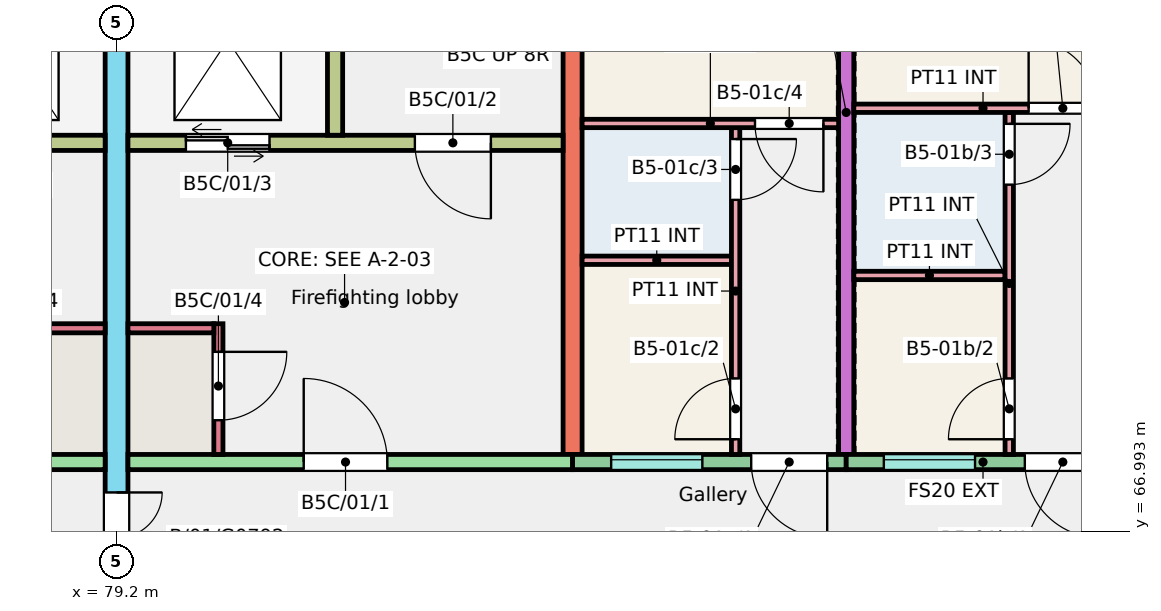
"""IFC4 building model, lengths in metres.
Left out: names, types, materials, properties, quantities, classifications, styles, units other than length and angle.
Written with IfcOpenShell. Run it as: python <this file> out.ifc"""

import sys

from ifc_helpers import new_model, si_unit, direction, frame, frame_2d, origin, place, context, subcontext, project, spatial, rectangle, extrude, element, fill, save


model = new_model("IFC4")
c1 = context("Model", 3, precision=1e-05, world=origin(), true_north=direction((0.0, 1.0)))
c2 = subcontext(c1, "Body", "Model", "MODEL_VIEW")
j1 = project(units=[si_unit("LENGTHUNIT", "METRE"), si_unit("PLANEANGLEUNIT", "RADIAN")], contexts=[c1])
p1 = place(None, origin())
s1 = spatial("IfcSite", under=j1, at=p1, CompositionType="ELEMENT")
p2 = place(p1, origin())
s2 = spatial("IfcBuilding", under=s1, at=p2, CompositionType="ELEMENT")
p3 = place(p2, frame((0.0, 0.0, 3.0)))
s3 = spatial("IfcBuildingStorey", under=s2, at=p3, CompositionType="ELEMENT", Elevation=3.0)
p4 = place(p3, frame((79.2, 66.0, 0.0), z_axis=(0.0, 0.0, 1.0), x_axis=(0.0, 1.0, 0.0)))
e1 = element("IfcWall", 1, at=p4, inside=s3, PredefinedType="SHEAR", context=c2, shape_type="SweptSolid", body=[
    extrude(rectangle(XDim=11.0, YDim=0.3, at=frame_2d((5.5, 0.0))), origin(), (0.0, 0.0, 1.0), 3.0),
])
p5 = place(p4, frame((0.3, 0.0, 0.0)))
e2 = element("IfcOpeningElement", 2, at=p5, cuts=e1, PredefinedType="OPENING", context=c2, shape_type="SweptSolid", body=[
    extrude(rectangle(XDim=1.2, YDim=2.1, at=frame_2d((0.6, 1.05))), frame((0.0, 0.16, 0.0), z_axis=(0.0, -1.0, 0.0), x_axis=(1.0, 0.0, 0.0)), (0.0, 0.0, 1.0), 0.32),
])
p6 = place(p3, frame((85.2, 68.0, 0.0), z_axis=(0.0, 0.0, 1.0), x_axis=(0.0, 1.0, 0.0)))
e3 = element("IfcWall", 3, at=p6, inside=s3, PredefinedType="SHEAR", context=c2, shape_type="SweptSolid", body=[
    extrude(rectangle(XDim=9.0, YDim=0.25, at=frame_2d((4.5, 0.0))), origin(), (0.0, 0.0, 1.0), 3.0),
])
p7 = place(p3, frame((88.8, 68.0, 0.0), z_axis=(0.0, 0.0, 1.0), x_axis=(0.0, 1.0, 0.0)))
e4 = element("IfcWall", 4, at=p7, inside=s3, PredefinedType="SHEAR", context=c2, shape_type="SweptSolid", body=[
    extrude(rectangle(XDim=9.0, YDim=0.2, at=frame_2d((4.5, 0.0))), origin(), (0.0, 0.0, 1.0), 3.0),
])
p8 = place(p3, frame((73.2, 67.9, 0.0), z_axis=(0.0, 0.0, 1.0), x_axis=(1.0, 0.0, 0.0)))
e5 = element("IfcWall", 5, at=p8, inside=s3, PredefinedType="SHEAR", context=c2, shape_type="SweptSolid", body=[
    extrude(rectangle(XDim=5.85, YDim=0.2, at=frame_2d((2.925, 0.0))), origin(), (0.0, 0.0, 1.0), 3.0),
])
p9 = place(p8, frame((2.438, 0.0, 0.0)))
e6 = element("IfcOpeningElement", 6, at=p9, cuts=e5, PredefinedType="OPENING", context=c2, shape_type="SweptSolid", body=[
    extrude(rectangle(XDim=1.1, YDim=2.1, at=frame_2d((0.55, 1.05))), frame((0.0, 0.11, 0.0), z_axis=(0.0, -1.0, 0.0), x_axis=(1.0, 0.0, 0.0)), (0.0, 0.0, 1.0), 0.22),
])
p10 = place(p3, frame((73.325, 72.1, 0.0), z_axis=(0.0, 0.0, 1.0), x_axis=(1.0, 0.0, 0.0)))
e7 = element("IfcWall", 7, at=p10, inside=s3, PredefinedType="SHEAR", context=c2, shape_type="SweptSolid", body=[
    extrude(rectangle(XDim=5.725, YDim=0.2, at=frame_2d((2.863, 0.0))), origin(), (0.0, 0.0, 1.0), 3.0),
])
p11 = place(p10, frame((0.95, 0.0, 0.0)))
e8 = element("IfcOpeningElement", 8, at=p11, cuts=e7, PredefinedType="OPENING", context=c2, shape_type="SweptSolid", body=[
    extrude(rectangle(XDim=1.0, YDim=2.1, at=frame_2d((0.5, 1.05))), frame((0.0, 0.11, 0.0), z_axis=(0.0, -1.0, 0.0), x_axis=(1.0, 0.0, 0.0)), (0.0, 0.0, 1.0), 0.22),
])
p12 = place(p10, frame((3.863, 0.0, 0.0)))
e9 = element("IfcOpeningElement", 9, at=p12, cuts=e7, PredefinedType="OPENING", context=c2, shape_type="SweptSolid", body=[
    extrude(rectangle(XDim=1.1, YDim=2.1, at=frame_2d((0.55, 1.05))), frame((0.0, 0.11, 0.0), z_axis=(0.0, -1.0, 0.0), x_axis=(1.0, 0.0, 0.0)), (0.0, 0.0, 1.0), 0.22),
])
p13 = place(p3, frame((77.92, 69.66, 0.0), z_axis=(0.0, 0.0, 1.0), x_axis=(1.0, 0.0, 0.0)))
e10 = element("IfcWall", 10, at=p13, inside=s3, PredefinedType="SHEAR", context=c2, shape_type="SweptSolid", body=[
    extrude(rectangle(XDim=1.13, YDim=0.12, at=frame_2d((0.565, 0.0))), origin(), (0.0, 0.0, 1.0), 3.0),
])
p14 = place(p3, frame((79.35, 67.9, 0.0), z_axis=(0.0, 0.0, 1.0), x_axis=(1.0, 0.0, 0.0)))
e11 = element("IfcWall", 11, at=p14, inside=s3, PredefinedType="SHEAR", context=c2, shape_type="SweptSolid", body=[
    extrude(rectangle(XDim=5.85, YDim=0.2, at=frame_2d((2.925, 0.0))), origin(), (0.0, 0.0, 1.0), 3.0),
])
p15 = place(p14, frame((2.312, 0.0, 0.0)))
e12 = element("IfcOpeningElement", 12, at=p15, cuts=e11, PredefinedType="OPENING", context=c2, shape_type="SweptSolid", body=[
    extrude(rectangle(XDim=1.1, YDim=2.1, at=frame_2d((0.55, 1.05))), frame((0.0, 0.11, 0.0), z_axis=(0.0, -1.0, 0.0), x_axis=(1.0, 0.0, 0.0)), (0.0, 0.0, 1.0), 0.22),
])
p16 = place(p3, frame((79.35, 72.1, 0.0), z_axis=(0.0, 0.0, 1.0), x_axis=(1.0, 0.0, 0.0)))
e13 = element("IfcWall", 13, at=p16, inside=s3, PredefinedType="SHEAR", context=c2, shape_type="SweptSolid", body=[
    extrude(rectangle(XDim=5.725, YDim=0.2, at=frame_2d((2.862, 0.0))), origin(), (0.0, 0.0, 1.0), 3.0),
])
p17 = place(p16, frame((3.775, 0.0, 0.0)))
e14 = element("IfcOpeningElement", 14, at=p17, cuts=e13, PredefinedType="OPENING", context=c2, shape_type="SweptSolid", body=[
    extrude(rectangle(XDim=1.0, YDim=2.1, at=frame_2d((0.5, 1.05))), frame((0.0, 0.11, 0.0), z_axis=(0.0, -1.0, 0.0), x_axis=(1.0, 0.0, 0.0)), (0.0, 0.0, 1.0), 0.22),
])
p18 = place(p16, frame((0.762, 0.0, 0.0)))
e15 = element("IfcOpeningElement", 15, at=p18, cuts=e13, PredefinedType="OPENING", context=c2, shape_type="SweptSolid", body=[
    extrude(rectangle(XDim=1.1, YDim=2.1, at=frame_2d((0.55, 1.05))), frame((0.0, 0.11, 0.0), z_axis=(0.0, -1.0, 0.0), x_axis=(1.0, 0.0, 0.0)), (0.0, 0.0, 1.0), 0.22),
])
p19 = place(p3, frame((82.075, 72.2, 0.0), z_axis=(0.0, 0.0, 1.0), x_axis=(0.0, 1.0, 0.0)))
e16 = element("IfcWall", 16, at=p19, inside=s3, PredefinedType="SHEAR", context=c2, shape_type="SweptSolid", body=[
    extrude(rectangle(XDim=4.8, YDim=0.2, at=frame_2d((2.4, 0.0))), origin(), (0.0, 0.0, 1.0), 3.0),
])
p20 = place(p3, frame((80.54, 68.0, 0.0), z_axis=(0.0, 0.0, 1.0), x_axis=(0.0, 1.0, 0.0)))
e17 = element("IfcWall", 17, at=p20, inside=s3, PredefinedType="SHEAR", context=c2, shape_type="SweptSolid", body=[
    extrude(rectangle(XDim=1.72, YDim=0.12, at=frame_2d((0.86, 0.0))), origin(), (0.0, 0.0, 1.0), 3.0),
])
p21 = place(p20, frame((0.45, 0.0, 0.0)))
e18 = element("IfcOpeningElement", 18, at=p21, cuts=e17, PredefinedType="OPENING", context=c2, shape_type="SweptSolid", body=[
    extrude(rectangle(XDim=0.9, YDim=2.1, at=frame_2d((0.45, 1.05))), frame((0.0, 0.07, 0.0), z_axis=(0.0, -1.0, 0.0), x_axis=(1.0, 0.0, 0.0)), (0.0, 0.0, 1.0), 0.14),
])
p22 = place(p3, frame((79.35, 69.66, 0.0), z_axis=(0.0, 0.0, 1.0), x_axis=(1.0, 0.0, 0.0)))
e19 = element("IfcWall", 19, at=p22, inside=s3, PredefinedType="SHEAR", context=c2, shape_type="SweptSolid", body=[
    extrude(rectangle(XDim=1.13, YDim=0.12, at=frame_2d((0.565, 0.0))), origin(), (0.0, 0.0, 1.0), 3.0),
])
p23 = place(p3, frame((85.2, 67.9, 0.0), z_axis=(0.0, 0.0, 1.0), x_axis=(1.0, 0.0, 0.0)))
e20 = element("IfcWall", 20, at=p23, inside=s3, PredefinedType="SOLIDWALL", context=c2, shape_type="SweptSolid", body=[
    extrude(rectangle(XDim=3.6, YDim=0.2, at=frame_2d((1.8, 0.0))), origin(), (0.0, 0.0, 1.0), 3.0),
])
p24 = place(p23, frame((0.508, 0.0, 1.1)))
e21 = element("IfcOpeningElement", 21, at=p24, cuts=e20, PredefinedType="OPENING", context=c2, shape_type="SweptSolid", body=[
    extrude(rectangle(XDim=1.2, YDim=1.3, at=frame_2d((0.6, 0.65))), frame((0.0, 0.11, 0.0), z_axis=(0.0, -1.0, 0.0), x_axis=(1.0, 0.0, 0.0)), (0.0, 0.0, 1.0), 0.22),
])
p25 = place(p23, frame((2.35, 0.0, 0.0)))
e22 = element("IfcOpeningElement", 22, at=p25, cuts=e20, PredefinedType="OPENING", context=c2, shape_type="SweptSolid", body=[
    extrude(rectangle(XDim=1.0, YDim=2.1, at=frame_2d((0.5, 1.05))), frame((0.0, 0.11, 0.0), z_axis=(0.0, -1.0, 0.0), x_axis=(1.0, 0.0, 0.0)), (0.0, 0.0, 1.0), 0.22),
])
p26 = place(p3, frame((88.8, 67.9, 0.0), z_axis=(0.0, 0.0, 1.0), x_axis=(1.0, 0.0, 0.0)))
e23 = element("IfcWall", 23, at=p26, inside=s3, PredefinedType="SOLIDWALL", context=c2, shape_type="SweptSolid", body=[
    extrude(rectangle(XDim=3.6, YDim=0.2, at=frame_2d((1.8, 0.0))), origin(), (0.0, 0.0, 1.0), 3.0),
])
p27 = place(p26, frame((0.495, 0.0, 1.1)))
e24 = element("IfcOpeningElement", 24, at=p27, cuts=e23, PredefinedType="OPENING", context=c2, shape_type="SweptSolid", body=[
    extrude(rectangle(XDim=1.2, YDim=1.3, at=frame_2d((0.6, 0.65))), frame((0.0, 0.11, 0.0), z_axis=(0.0, -1.0, 0.0), x_axis=(1.0, 0.0, 0.0)), (0.0, 0.0, 1.0), 0.22),
])
p28 = place(p26, frame((2.35, 0.0, 0.0)))
e25 = element("IfcOpeningElement", 25, at=p28, cuts=e23, PredefinedType="OPENING", context=c2, shape_type="SweptSolid", body=[
    extrude(rectangle(XDim=1.0, YDim=2.1, at=frame_2d((0.5, 1.05))), frame((0.0, 0.11, 0.0), z_axis=(0.0, -1.0, 0.0), x_axis=(1.0, 0.0, 0.0)), (0.0, 0.0, 1.0), 0.22),
])
p29 = place(p3, frame((88.9, 70.355, 0.0), z_axis=(0.0, 0.0, 1.0), x_axis=(1.0, 0.0, 0.0)))
e26 = element("IfcWall", 26, at=p29, inside=s3, PredefinedType="PARTITIONING", context=c2, shape_type="SweptSolid", body=[
    extrude(rectangle(XDim=1.99, YDim=0.11, at=frame_2d((0.995, 0.0))), origin(), (0.0, 0.0, 1.0), 2.8),
])
p30 = place(p3, frame((90.945, 68.0, 0.0), z_axis=(0.0, 0.0, 1.0), x_axis=(0.0, 1.0, 0.0)))
e27 = element("IfcWall", 27, at=p30, inside=s3, PredefinedType="PARTITIONING", context=c2, shape_type="SweptSolid", body=[
    extrude(rectangle(XDim=4.5, YDim=0.11, at=frame_2d((2.25, 0.0))), origin(), (0.0, 0.0, 1.0), 2.8),
])
p31 = place(p30, frame((0.2, 0.0, 0.0)))
e28 = element("IfcOpeningElement", 28, at=p31, cuts=e27, PredefinedType="OPENING", context=c2, shape_type="SweptSolid", body=[
    extrude(rectangle(XDim=0.8, YDim=2.1, at=frame_2d((0.4, 1.05))), frame((0.0, 0.065, 0.0), z_axis=(0.0, -1.0, 0.0), x_axis=(1.0, 0.0, 0.0)), (0.0, 0.0, 1.0), 0.13),
])
p32 = place(p30, frame((3.55, 0.0, 0.0)))
e29 = element("IfcOpeningElement", 29, at=p32, cuts=e27, PredefinedType="OPENING", context=c2, shape_type="SweptSolid", body=[
    extrude(rectangle(XDim=0.8, YDim=2.1, at=frame_2d((0.4, 1.05))), frame((0.0, 0.065, 0.0), z_axis=(0.0, -1.0, 0.0), x_axis=(1.0, 0.0, 0.0)), (0.0, 0.0, 1.0), 0.13),
])
p33 = place(p3, frame((88.9, 72.555, 0.0), z_axis=(0.0, 0.0, 1.0), x_axis=(1.0, 0.0, 0.0)))
e30 = element("IfcWall", 30, at=p33, inside=s3, PredefinedType="PARTITIONING", context=c2, shape_type="SweptSolid", body=[
    extrude(rectangle(XDim=3.4, YDim=0.11, at=frame_2d((1.7, 0.0))), origin(), (0.0, 0.0, 1.0), 2.8),
])
p34 = place(p33, frame((2.3, 0.0, 0.0)))
e31 = element("IfcOpeningElement", 31, at=p34, cuts=e30, PredefinedType="OPENING", context=c2, shape_type="SweptSolid", body=[
    extrude(rectangle(XDim=0.9, YDim=2.1, at=frame_2d((0.45, 1.05))), frame((0.0, 0.065, 0.0), z_axis=(0.0, -1.0, 0.0), x_axis=(1.0, 0.0, 0.0)), (0.0, 0.0, 1.0), 0.13),
])
p35 = place(p3, frame((85.325, 70.555, 0.0), z_axis=(0.0, 0.0, 1.0), x_axis=(1.0, 0.0, 0.0)))
e32 = element("IfcWall", 32, at=p35, inside=s3, PredefinedType="PARTITIONING", context=c2, shape_type="SweptSolid", body=[
    extrude(rectangle(XDim=1.965, YDim=0.11, at=frame_2d((0.982, 0.0))), origin(), (0.0, 0.0, 1.0), 2.8),
])
p36 = place(p3, frame((87.345, 68.0, 0.0), z_axis=(0.0, 0.0, 1.0), x_axis=(0.0, 1.0, 0.0)))
e33 = element("IfcWall", 33, at=p36, inside=s3, PredefinedType="PARTITIONING", context=c2, shape_type="SweptSolid", body=[
    extrude(rectangle(XDim=4.3, YDim=0.11, at=frame_2d((2.15, 0.0))), origin(), (0.0, 0.0, 1.0), 2.8),
])
p37 = place(p36, frame((0.2, 0.0, 0.0)))
e34 = element("IfcOpeningElement", 34, at=p37, cuts=e33, PredefinedType="OPENING", context=c2, shape_type="SweptSolid", body=[
    extrude(rectangle(XDim=0.8, YDim=2.1, at=frame_2d((0.4, 1.05))), frame((0.0, 0.065, 0.0), z_axis=(0.0, -1.0, 0.0), x_axis=(1.0, 0.0, 0.0)), (0.0, 0.0, 1.0), 0.13),
])
p38 = place(p36, frame((3.35, 0.0, 0.0)))
e35 = element("IfcOpeningElement", 35, at=p38, cuts=e33, PredefinedType="OPENING", context=c2, shape_type="SweptSolid", body=[
    extrude(rectangle(XDim=0.8, YDim=2.1, at=frame_2d((0.4, 1.05))), frame((0.0, 0.065, 0.0), z_axis=(0.0, -1.0, 0.0), x_axis=(1.0, 0.0, 0.0)), (0.0, 0.0, 1.0), 0.13),
])
p39 = place(p3, frame((85.325, 72.355, 0.0), z_axis=(0.0, 0.0, 1.0), x_axis=(1.0, 0.0, 0.0)))
e36 = element("IfcWall", 36, at=p39, inside=s3, PredefinedType="PARTITIONING", context=c2, shape_type="SweptSolid", body=[
    extrude(rectangle(XDim=3.375, YDim=0.11, at=frame_2d((1.688, 0.0))), origin(), (0.0, 0.0, 1.0), 2.8),
])
p40 = place(p39, frame((2.275, 0.0, 0.0)))
e37 = element("IfcOpeningElement", 37, at=p40, cuts=e36, PredefinedType="OPENING", context=c2, shape_type="SweptSolid", body=[
    extrude(rectangle(XDim=0.9, YDim=2.1, at=frame_2d((0.45, 1.05))), frame((0.0, 0.065, 0.0), z_axis=(0.0, -1.0, 0.0), x_axis=(1.0, 0.0, 0.0)), (0.0, 0.0, 1.0), 0.13),
])
p41 = place(p27, origin())
e38 = element("IfcWindow", 38, at=p41, inside=s3, PartitioningType="SINGLE_PANEL", PredefinedType="WINDOW", context=c2, shape_type="SweptSolid", body=[
    extrude(rectangle(XDim=1.2, YDim=1.3, at=frame_2d((0.6, 0.65))), frame((0.0, 0.06, 0.0), z_axis=(0.0, -1.0, 0.0), x_axis=(1.0, 0.0, 0.0)), (0.0, 0.0, 1.0), 0.06),
])
fill(e24, e38)
p42 = place(p24, origin())
e39 = element("IfcWindow", 39, at=p42, inside=s3, PartitioningType="SINGLE_PANEL", PredefinedType="WINDOW", context=c2, shape_type="SweptSolid", body=[
    extrude(rectangle(XDim=1.2, YDim=1.3, at=frame_2d((0.6, 0.65))), frame((0.0, 0.06, 0.0), z_axis=(0.0, -1.0, 0.0), x_axis=(1.0, 0.0, 0.0)), (0.0, 0.0, 1.0), 0.06),
])
fill(e21, e39)
p43 = place(p28, origin())
e40 = element("IfcDoor", 40, at=p43, inside=s3, OperationType="SINGLE_SWING_RIGHT", PredefinedType="DOOR", context=c2, shape_type="SweptSolid", body=[
    extrude(rectangle(XDim=1.0, YDim=2.1, at=frame_2d((0.5, 1.05))), frame((0.0, 0.025, 0.0), z_axis=(0.0, -1.0, 0.0), x_axis=(1.0, 0.0, 0.0)), (0.0, 0.0, 1.0), 0.05),
])
fill(e25, e40)
p44 = place(p31, origin())
e41 = element("IfcDoor", 41, at=p44, inside=s3, OperationType="SINGLE_SWING_LEFT", PredefinedType="DOOR", context=c2, shape_type="SweptSolid", body=[
    extrude(rectangle(XDim=0.8, YDim=2.1, at=frame_2d((0.4, 1.05))), frame((0.0, 0.025, 0.0), z_axis=(0.0, -1.0, 0.0), x_axis=(1.0, 0.0, 0.0)), (0.0, 0.0, 1.0), 0.05),
])
fill(e28, e41)
p45 = place(p32, origin())
e42 = element("IfcDoor", 42, at=p45, inside=s3, OperationType="SINGLE_SWING_RIGHT", PredefinedType="DOOR", context=c2, shape_type="SweptSolid", body=[
    extrude(rectangle(XDim=0.8, YDim=2.1, at=frame_2d((0.4, 1.05))), frame((0.0, 0.025, 0.0), z_axis=(0.0, -1.0, 0.0), x_axis=(1.0, 0.0, 0.0)), (0.0, 0.0, 1.0), 0.05),
])
fill(e29, e42)
p46 = place(p34, origin())
e43 = element("IfcDoor", 43, at=p46, inside=s3, OperationType="SINGLE_SWING_LEFT", PredefinedType="DOOR", context=c2, shape_type="SweptSolid", body=[
    extrude(rectangle(XDim=0.9, YDim=2.1, at=frame_2d((0.45, 1.05))), frame((0.0, 0.025, 0.0), z_axis=(0.0, -1.0, 0.0), x_axis=(1.0, 0.0, 0.0)), (0.0, 0.0, 1.0), 0.05),
])
fill(e31, e43)
p47 = place(p25, origin())
e44 = element("IfcDoor", 44, at=p47, inside=s3, OperationType="SINGLE_SWING_RIGHT", PredefinedType="DOOR", context=c2, shape_type="SweptSolid", body=[
    extrude(rectangle(XDim=1.0, YDim=2.1, at=frame_2d((0.5, 1.05))), frame((0.0, 0.025, 0.0), z_axis=(0.0, -1.0, 0.0), x_axis=(1.0, 0.0, 0.0)), (0.0, 0.0, 1.0), 0.05),
])
fill(e22, e44)
p48 = place(p37, origin())
e45 = element("IfcDoor", 45, at=p48, inside=s3, OperationType="SINGLE_SWING_LEFT", PredefinedType="DOOR", context=c2, shape_type="SweptSolid", body=[
    extrude(rectangle(XDim=0.8, YDim=2.1, at=frame_2d((0.4, 1.05))), frame((0.0, 0.025, 0.0), z_axis=(0.0, -1.0, 0.0), x_axis=(1.0, 0.0, 0.0)), (0.0, 0.0, 1.0), 0.05),
])
fill(e34, e45)
p49 = place(p38, origin())
e46 = element("IfcDoor", 46, at=p49, inside=s3, OperationType="SINGLE_SWING_RIGHT", PredefinedType="DOOR", context=c2, shape_type="SweptSolid", body=[
    extrude(rectangle(XDim=0.8, YDim=2.1, at=frame_2d((0.4, 1.05))), frame((0.0, 0.025, 0.0), z_axis=(0.0, -1.0, 0.0), x_axis=(1.0, 0.0, 0.0)), (0.0, 0.0, 1.0), 0.05),
])
fill(e35, e46)
p50 = place(p40, origin())
e47 = element("IfcDoor", 47, at=p50, inside=s3, OperationType="SINGLE_SWING_RIGHT", PredefinedType="DOOR", context=c2, shape_type="SweptSolid", body=[
    extrude(rectangle(XDim=0.9, YDim=2.1, at=frame_2d((0.45, 1.05))), frame((0.0, 0.025, 0.0), z_axis=(0.0, -1.0, 0.0), x_axis=(1.0, 0.0, 0.0)), (0.0, 0.0, 1.0), 0.05),
])
fill(e37, e47)
p51 = place(p15, origin())
e48 = element("IfcDoor", 48, at=p51, inside=s3, OperationType="SINGLE_SWING_LEFT", PredefinedType="DOOR", context=c2, shape_type="SweptSolid", body=[
    extrude(rectangle(XDim=1.1, YDim=2.1, at=frame_2d((0.55, 1.05))), frame((0.0, 0.025, 0.0), z_axis=(0.0, -1.0, 0.0), x_axis=(1.0, 0.0, 0.0)), (0.0, 0.0, 1.0), 0.05),
])
fill(e12, e48)
p52 = place(p17, origin())
e49 = element("IfcDoor", 49, at=p52, inside=s3, OperationType="SINGLE_SWING_RIGHT", PredefinedType="DOOR", context=c2, shape_type="SweptSolid", body=[
    extrude(rectangle(XDim=1.0, YDim=2.1, at=frame_2d((0.5, 1.05))), frame((0.0, 0.025, 0.0), z_axis=(0.0, -1.0, 0.0), x_axis=(1.0, 0.0, 0.0)), (0.0, 0.0, 1.0), 0.05),
])
fill(e14, e49)
p53 = place(p18, origin())
e50 = element("IfcDoor", 50, at=p53, inside=s3, OperationType="DOUBLE_DOOR_SLIDING", PredefinedType="DOOR", context=c2, shape_type="SweptSolid", body=[
    extrude(rectangle(XDim=1.1, YDim=2.1, at=frame_2d((0.55, 1.05))), frame((0.0, 0.025, 0.0), z_axis=(0.0, -1.0, 0.0), x_axis=(1.0, 0.0, 0.0)), (0.0, 0.0, 1.0), 0.05),
])
fill(e15, e50)
p54 = place(p21, origin())
e51 = element("IfcDoor", 51, at=p54, inside=s3, OperationType="SINGLE_SWING_RIGHT", PredefinedType="DOOR", context=c2, shape_type="SweptSolid", body=[
    extrude(rectangle(XDim=0.9, YDim=2.1, at=frame_2d((0.45, 1.05))), frame((0.0, 0.025, 0.0), z_axis=(0.0, -1.0, 0.0), x_axis=(1.0, 0.0, 0.0)), (0.0, 0.0, 1.0), 0.05),
])
fill(e18, e51)
p55 = place(p5, origin())
e52 = element("IfcDoor", 52, at=p55, inside=s3, OperationType="DOUBLE_DOOR_SINGLE_SWING", PredefinedType="DOOR", context=c2, shape_type="SweptSolid", body=[
    extrude(rectangle(XDim=1.2, YDim=2.1, at=frame_2d((0.6, 1.05))), frame((0.0, 0.025, 0.0), z_axis=(0.0, -1.0, 0.0), x_axis=(1.0, 0.0, 0.0)), (0.0, 0.0, 1.0), 0.05),
])
fill(e2, e52)
save(model, sys.argv[1])
